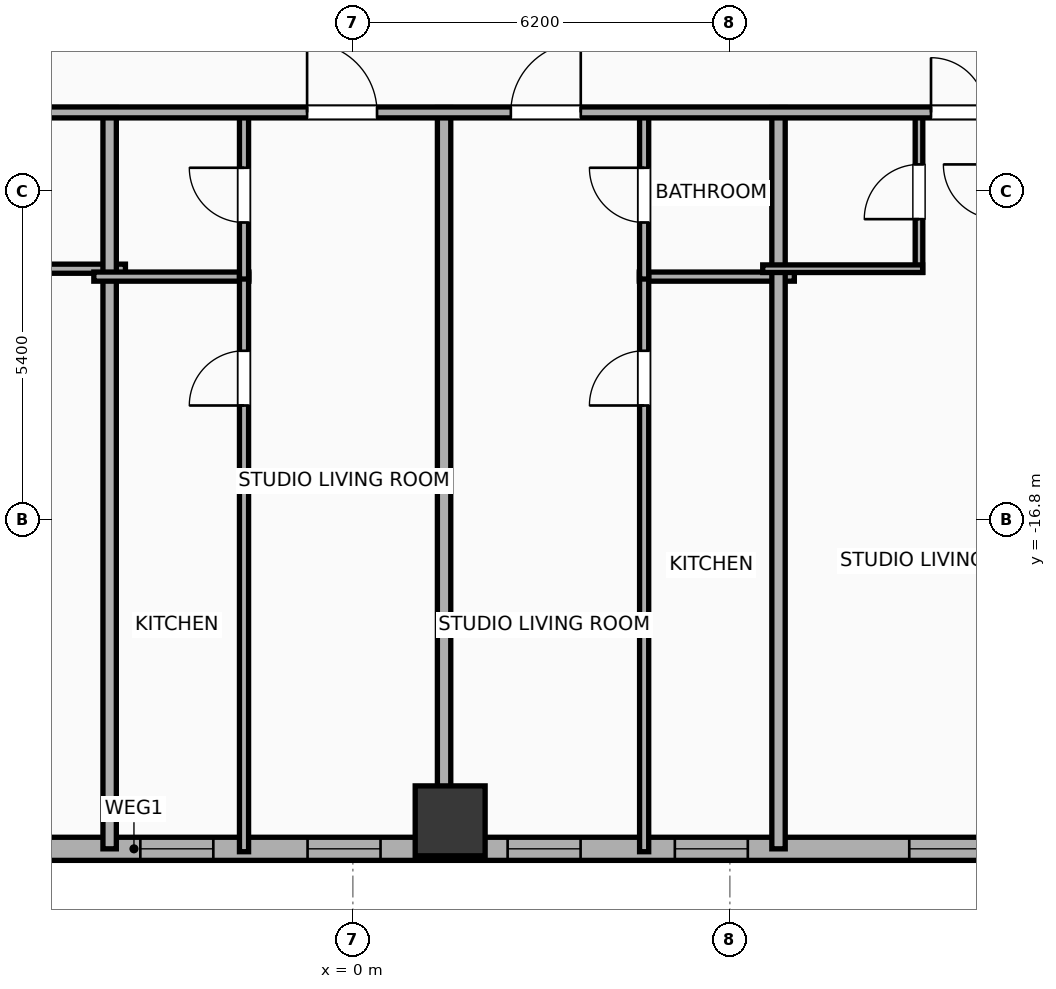
"""IFC4 building model, lengths in metres.
Left out: names, types, materials, properties, quantities, classifications, styles, units other than length and angle.
Written with IfcOpenShell. Run it as: python <this file> out.ifc"""

import sys

from ifc_helpers import new_model, si_unit, direction, frame, frame_2d, origin, origin_2d, place, context, subcontext, project, spatial, rectangle, hollow_rectangle, extrude, element, fill, save


model = new_model("IFC4")
c1 = context("Model", 3, precision=1e-05, world=origin(), true_north=direction((0.0, 1.0)))
c2 = subcontext(c1, "Body", "Model", "MODEL_VIEW")
j1 = project(units=[si_unit("LENGTHUNIT", "METRE"), si_unit("PLANEANGLEUNIT", "RADIAN")], contexts=[c1])
p1 = place(None, origin())
s1 = spatial("IfcSite", under=j1, at=p1, CompositionType="ELEMENT")
p2 = place(p1, origin())
s2 = spatial("IfcBuilding", under=s1, at=p2, CompositionType="ELEMENT")
p3 = place(p2, frame((0.0, 0.0, 68.9)))
s3 = spatial("IfcBuildingStorey", under=s2, at=p3, CompositionType="ELEMENT", Elevation=68.9)
p4 = place(p3, frame((1.6, -21.75, 0.0), z_axis=(0.0, 0.0, 1.0), x_axis=(1.0, 0.0, 0.0)))
e1 = element("IfcColumn", 1, at=p4, inside=s3, PredefinedType="COLUMN", context=c2, shape_type="SweptSolid", body=[
    extrude(hollow_rectangle(XDim=1.15, YDim=1.15, WallThickness=0.04, at=origin_2d()), origin(), (0.0, 0.0, 1.0), 3.9),
])
p5 = place(p3, frame((22.381, -22.21, 0.0), z_axis=(0.0, 0.0, 1.0), x_axis=(-1.0, 0.0, 0.0)))
e2 = element("IfcWall", 2, at=p5, inside=s3, PredefinedType="ELEMENTEDWALL", context=c2, shape_type="SweptSolid", body=[
    extrude(rectangle(XDim=51.963, YDim=0.38, at=frame_2d((25.981, 0.0))), origin(), (0.0, 0.0, 1.0), 3.65),
])
p6 = place(p5, frame((49.127, 0.0, 0.75)))
e3 = element("IfcOpeningElement", 3, at=p6, cuts=e2, PredefinedType="OPENING", context=c2, shape_type="SweptSolid", body=[
    extrude(rectangle(XDim=1.2, YDim=2.05, at=frame_2d((0.6, 1.025))), frame((0.0, 0.2, 0.0), z_axis=(0.0, -1.0, 0.0), x_axis=(1.0, 0.0, 0.0)), (0.0, 0.0, 1.0), 0.4),
])
p7 = place(p5, frame((43.926, 0.0, 0.75)))
e4 = element("IfcOpeningElement", 4, at=p7, cuts=e2, PredefinedType="OPENING", context=c2, shape_type="SweptSolid", body=[
    extrude(rectangle(XDim=1.2, YDim=2.05, at=frame_2d((0.6, 1.025))), frame((0.0, 0.2, 0.0), z_axis=(0.0, -1.0, 0.0), x_axis=(1.0, 0.0, 0.0)), (0.0, 0.0, 1.0), 0.4),
])
p8 = place(p5, frame((46.676, 0.0, 0.75)))
e5 = element("IfcOpeningElement", 5, at=p8, cuts=e2, PredefinedType="OPENING", context=c2, shape_type="SweptSolid", body=[
    extrude(rectangle(XDim=1.2, YDim=2.05, at=frame_2d((0.6, 1.025))), frame((0.0, 0.2, 0.0), z_axis=(0.0, -1.0, 0.0), x_axis=(1.0, 0.0, 0.0)), (0.0, 0.0, 1.0), 0.4),
])
p9 = place(p5, frame((39.531, 0.0, 0.75)))
e6 = element("IfcOpeningElement", 6, at=p9, cuts=e2, PredefinedType="OPENING", context=c2, shape_type="SweptSolid", body=[
    extrude(rectangle(XDim=1.2, YDim=2.05, at=frame_2d((0.6, 1.025))), frame((0.0, 0.2, 0.0), z_axis=(0.0, -1.0, 0.0), x_axis=(1.0, 0.0, 0.0)), (0.0, 0.0, 1.0), 0.4),
])
p10 = place(p5, frame((32.926, 0.0, 0.75)))
e7 = element("IfcOpeningElement", 7, at=p10, cuts=e2, PredefinedType="OPENING", context=c2, shape_type="SweptSolid", body=[
    extrude(rectangle(XDim=1.2, YDim=2.05, at=frame_2d((0.6, 1.025))), frame((0.0, 0.2, 0.0), z_axis=(0.0, -1.0, 0.0), x_axis=(1.0, 0.0, 0.0)), (0.0, 0.0, 1.0), 0.4),
])
p11 = place(p5, frame((35.676, 0.0, 0.75)))
e8 = element("IfcOpeningElement", 8, at=p11, cuts=e2, PredefinedType="OPENING", context=c2, shape_type="SweptSolid", body=[
    extrude(rectangle(XDim=1.2, YDim=2.05, at=frame_2d((0.6, 1.025))), frame((0.0, 0.2, 0.0), z_axis=(0.0, -1.0, 0.0), x_axis=(1.0, 0.0, 0.0)), (0.0, 0.0, 1.0), 0.4),
])
p12 = place(p5, frame((28.531, 0.0, 0.75)))
e9 = element("IfcOpeningElement", 9, at=p12, cuts=e2, PredefinedType="OPENING", context=c2, shape_type="SweptSolid", body=[
    extrude(rectangle(XDim=1.2, YDim=2.05, at=frame_2d((0.6, 1.025))), frame((0.0, 0.2, 0.0), z_axis=(0.0, -1.0, 0.0), x_axis=(1.0, 0.0, 0.0)), (0.0, 0.0, 1.0), 0.4),
])
p13 = place(p5, frame((21.926, 0.0, 0.75)))
e10 = element("IfcOpeningElement", 10, at=p13, cuts=e2, PredefinedType="OPENING", context=c2, shape_type="SweptSolid", body=[
    extrude(rectangle(XDim=1.2, YDim=2.05, at=frame_2d((0.6, 1.025))), frame((0.0, 0.2, 0.0), z_axis=(0.0, -1.0, 0.0), x_axis=(1.0, 0.0, 0.0)), (0.0, 0.0, 1.0), 0.4),
])
p14 = place(p5, frame((24.676, 0.0, 0.75)))
e11 = element("IfcOpeningElement", 11, at=p14, cuts=e2, PredefinedType="OPENING", context=c2, shape_type="SweptSolid", body=[
    extrude(rectangle(XDim=1.2, YDim=2.05, at=frame_2d((0.6, 1.025))), frame((0.0, 0.2, 0.0), z_axis=(0.0, -1.0, 0.0), x_axis=(1.0, 0.0, 0.0)), (0.0, 0.0, 1.0), 0.4),
])
p15 = place(p5, frame((18.636, 0.0, 0.75)))
e12 = element("IfcOpeningElement", 12, at=p15, cuts=e2, PredefinedType="OPENING", context=c2, shape_type="SweptSolid", body=[
    extrude(rectangle(XDim=1.2, YDim=2.05, at=frame_2d((0.6, 1.025))), frame((0.0, 0.2, 0.0), z_axis=(0.0, -1.0, 0.0), x_axis=(1.0, 0.0, 0.0)), (0.0, 0.0, 1.0), 0.4),
])
p16 = place(p5, frame((15.886, 0.0, 0.75)))
e13 = element("IfcOpeningElement", 13, at=p16, cuts=e2, PredefinedType="OPENING", context=c2, shape_type="SweptSolid", body=[
    extrude(rectangle(XDim=1.2, YDim=2.05, at=frame_2d((0.6, 1.025))), frame((0.0, 0.2, 0.0), z_axis=(0.0, -1.0, 0.0), x_axis=(1.0, 0.0, 0.0)), (0.0, 0.0, 1.0), 0.4),
])
p17 = place(p5, frame((12.031, 0.0, 0.75)))
e14 = element("IfcOpeningElement", 14, at=p17, cuts=e2, PredefinedType="OPENING", context=c2, shape_type="SweptSolid", body=[
    extrude(rectangle(XDim=1.2, YDim=2.05, at=frame_2d((0.6, 1.025))), frame((0.0, 0.2, 0.0), z_axis=(0.0, -1.0, 0.0), x_axis=(1.0, 0.0, 0.0)), (0.0, 0.0, 1.0), 0.4),
])
p18 = place(p5, frame((7.636, 0.0, 0.75)))
e15 = element("IfcOpeningElement", 15, at=p18, cuts=e2, PredefinedType="OPENING", context=c2, shape_type="SweptSolid", body=[
    extrude(rectangle(XDim=1.2, YDim=2.05, at=frame_2d((0.6, 1.025))), frame((0.0, 0.2, 0.0), z_axis=(0.0, -1.0, 0.0), x_axis=(1.0, 0.0, 0.0)), (0.0, 0.0, 1.0), 0.4),
])
p19 = place(p5, frame((4.886, 0.0, 0.75)))
e16 = element("IfcOpeningElement", 16, at=p19, cuts=e2, PredefinedType="OPENING", context=c2, shape_type="SweptSolid", body=[
    extrude(rectangle(XDim=1.2, YDim=2.05, at=frame_2d((0.6, 1.025))), frame((0.0, 0.2, 0.0), z_axis=(0.0, -1.0, 0.0), x_axis=(1.0, 0.0, 0.0)), (0.0, 0.0, 1.0), 0.4),
])
p20 = place(p5, frame((2.036, 0.0, 0.75)))
e17 = element("IfcOpeningElement", 17, at=p20, cuts=e2, PredefinedType="OPENING", context=c2, shape_type="SweptSolid", body=[
    extrude(rectangle(XDim=1.2, YDim=2.05, at=frame_2d((0.6, 1.025))), frame((0.0, 0.2, 0.0), z_axis=(0.0, -1.0, 0.0), x_axis=(1.0, 0.0, 0.0)), (0.0, 0.0, 1.0), 0.4),
])
p21 = place(p3, frame((-5.949, -12.67, 0.0), z_axis=(0.0, 0.0, 1.0), x_axis=(1.0, 0.0, 0.0)))
e18 = element("IfcWall", 18, at=p21, inside=s3, PredefinedType="PLUMBINGWALL", context=c2, shape_type="SweptSolid", body=[
    extrude(rectangle(XDim=2.209, YDim=0.15, at=frame_2d((1.104, 0.0))), origin(), (0.0, 0.0, 1.0), 3.65),
])
p22 = place(p3, frame((-4.0, -22.21, 0.0), z_axis=(0.0, 0.0, 1.0), x_axis=(0.0, 1.0, 0.0)))
e19 = element("IfcWall", 19, at=p22, inside=s3, PredefinedType="PARTITIONING", context=c2, shape_type="SweptSolid", body=[
    extrude(rectangle(XDim=12.19, YDim=0.22, at=frame_2d((6.095, 0.0))), origin(), (0.0, 0.0, 1.0), 3.65),
])
p23 = place(p3, frame((-4.26, -12.8, 0.0), z_axis=(0.0, 0.0, 1.0), x_axis=(1.0, 0.0, 0.0)))
e20 = element("IfcWall", 20, at=p23, inside=s3, PredefinedType="PLUMBINGWALL", context=c2, shape_type="SweptSolid", body=[
    extrude(rectangle(XDim=2.55, YDim=0.15, at=frame_2d((1.275, 0.0))), origin(), (0.0, 0.0, 1.0), 3.65),
])
p24 = place(p3, frame((-1.79, -22.258, 0.0), z_axis=(0.0, 0.0, 1.0), x_axis=(0.0, 1.0, 0.0)))
e21 = element("IfcWall", 21, at=p24, inside=s3, PredefinedType="PLUMBINGWALL", context=c2, shape_type="SweptSolid", body=[
    extrude(rectangle(XDim=9.498, YDim=0.15, at=frame_2d((4.749, 0.0))), origin(), (0.0, 0.0, 1.0), 3.65),
])
p25 = place(p24, frame((7.338, 0.0, 0.0)))
e22 = element("IfcOpeningElement", 22, at=p25, cuts=e21, PredefinedType="OPENING", context=c2, shape_type="SweptSolid", body=[
    extrude(rectangle(XDim=0.9, YDim=2.05, at=frame_2d((0.45, 1.025))), frame((0.0, 0.085, 0.0), z_axis=(0.0, -1.0, 0.0), x_axis=(1.0, 0.0, 0.0)), (0.0, 0.0, 1.0), 0.17),
])
p26 = place(p3, frame((-1.79, -12.84, 0.0), z_axis=(0.0, 0.0, 1.0), x_axis=(0.0, 1.0, 0.0)))
e23 = element("IfcWall", 23, at=p26, inside=s3, PredefinedType="PLUMBINGWALL", context=c2, shape_type="SweptSolid", body=[
    extrude(rectangle(XDim=2.76, YDim=0.15, at=frame_2d((1.38, 0.0))), origin(), (0.0, 0.0, 1.0), 3.65),
])
p27 = place(p26, frame((0.93, 0.0, 0.0)))
e24 = element("IfcOpeningElement", 24, at=p27, cuts=e23, PredefinedType="OPENING", context=c2, shape_type="SweptSolid", body=[
    extrude(rectangle(XDim=0.9, YDim=2.05, at=frame_2d((0.45, 1.025))), frame((0.0, 0.085, 0.0), z_axis=(0.0, -1.0, 0.0), x_axis=(1.0, 0.0, 0.0)), (0.0, 0.0, 1.0), 0.17),
])
p28 = place(p3, frame((1.5, -22.21, 0.0), z_axis=(0.0, 0.0, 1.0), x_axis=(0.0, 1.0, 0.0)))
e25 = element("IfcWall", 25, at=p28, inside=s3, PredefinedType="PARTITIONING", context=c2, shape_type="SweptSolid", body=[
    extrude(rectangle(XDim=12.19, YDim=0.22, at=frame_2d((6.095, 0.0))), origin(), (0.0, 0.0, 1.0), 2.94),
])
p29 = place(p3, frame((4.71, -12.8, 0.0), z_axis=(0.0, 0.0, 1.0), x_axis=(1.0, 0.0, 0.0)))
e26 = element("IfcWall", 26, at=p29, inside=s3, PredefinedType="PLUMBINGWALL", context=c2, shape_type="SweptSolid", body=[
    extrude(rectangle(XDim=2.55, YDim=0.15, at=frame_2d((1.275, 0.0))), origin(), (0.0, 0.0, 1.0), 3.65),
])
p30 = place(p3, frame((4.79, -22.258, 0.0), z_axis=(0.0, 0.0, 1.0), x_axis=(0.0, 1.0, 0.0)))
e27 = element("IfcWall", 27, at=p30, inside=s3, PredefinedType="PLUMBINGWALL", context=c2, shape_type="SweptSolid", body=[
    extrude(rectangle(XDim=9.498, YDim=0.15, at=frame_2d((4.749, 0.0))), origin(), (0.0, 0.0, 1.0), 3.65),
])
p31 = place(p30, frame((7.338, 0.0, 0.0)))
e28 = element("IfcOpeningElement", 28, at=p31, cuts=e27, PredefinedType="OPENING", context=c2, shape_type="SweptSolid", body=[
    extrude(rectangle(XDim=0.9, YDim=2.05, at=frame_2d((0.45, 1.025))), frame((0.0, 0.085, 0.0), z_axis=(0.0, -1.0, 0.0), x_axis=(1.0, 0.0, 0.0)), (0.0, 0.0, 1.0), 0.17),
])
p32 = place(p3, frame((4.79, -12.84, 0.0), z_axis=(0.0, 0.0, 1.0), x_axis=(0.0, 1.0, 0.0)))
e29 = element("IfcWall", 29, at=p32, inside=s3, PredefinedType="PLUMBINGWALL", context=c2, shape_type="SweptSolid", body=[
    extrude(rectangle(XDim=2.76, YDim=0.15, at=frame_2d((1.38, 0.0))), origin(), (0.0, 0.0, 1.0), 3.65),
])
p33 = place(p32, frame((0.93, 0.0, 0.0)))
e30 = element("IfcOpeningElement", 30, at=p33, cuts=e29, PredefinedType="OPENING", context=c2, shape_type="SweptSolid", body=[
    extrude(rectangle(XDim=0.9, YDim=2.05, at=frame_2d((0.45, 1.025))), frame((0.0, 0.085, 0.0), z_axis=(0.0, -1.0, 0.0), x_axis=(1.0, 0.0, 0.0)), (0.0, 0.0, 1.0), 0.17),
])
p34 = place(p3, frame((7.0, -22.21, 0.0), z_axis=(0.0, 0.0, 1.0), x_axis=(0.0, 1.0, 0.0)))
e31 = element("IfcWall", 31, at=p34, inside=s3, PredefinedType="PARTITIONING", context=c2, shape_type="SweptSolid", body=[
    extrude(rectangle(XDim=12.19, YDim=0.22, at=frame_2d((6.095, 0.0))), origin(), (0.0, 0.0, 1.0), 3.65),
])
p35 = place(p3, frame((9.31, -12.73, 0.0), z_axis=(0.0, 0.0, 1.0), x_axis=(0.0, 1.0, 0.0)))
e32 = element("IfcWall", 32, at=p35, inside=s3, PredefinedType="PARTITIONING", context=c2, shape_type="SweptSolid", body=[
    extrude(rectangle(XDim=2.65, YDim=0.125, at=frame_2d((1.325, 0.0))), origin(), (0.0, 0.0, 1.0), 3.65),
])
p36 = place(p35, frame((0.875, 0.0, 0.0)))
e33 = element("IfcOpeningElement", 33, at=p36, cuts=e32, PredefinedType="OPENING", context=c2, shape_type="SweptSolid", body=[
    extrude(rectangle(XDim=0.9, YDim=2.05, at=frame_2d((0.45, 1.025))), frame((0.0, 0.073, 0.0), z_axis=(0.0, -1.0, 0.0), x_axis=(1.0, 0.0, 0.0)), (0.0, 0.0, 1.0), 0.145),
])
p37 = place(p3, frame((6.74, -12.67, 0.0), z_axis=(0.0, 0.0, 1.0), x_axis=(1.0, 0.0, 0.0)))
e34 = element("IfcWall", 34, at=p37, inside=s3, PredefinedType="PARTITIONING", context=c2, shape_type="SweptSolid", body=[
    extrude(rectangle(XDim=2.63, YDim=0.125, at=frame_2d((1.315, 0.0))), origin(), (0.0, 0.0, 1.0), 3.65),
])
p38 = place(p3, frame((-33.41, -10.1, 0.0), z_axis=(0.0, 0.0, 1.0), x_axis=(1.0, 0.0, 0.0)))
e35 = element("IfcWall", 35, at=p38, inside=s3, PredefinedType="PARTITIONING", context=c2, shape_type="SweptSolid", body=[
    extrude(rectangle(XDim=59.62, YDim=0.18, at=frame_2d((29.81, 0.0))), origin(), (0.0, 0.0, 1.0), 3.65),
])
p39 = place(p38, frame((3.259, 0.0, 0.0)))
e36 = element("IfcOpeningElement", 36, at=p39, cuts=e35, PredefinedType="OPENING", context=c2, shape_type="SweptSolid", body=[
    extrude(rectangle(XDim=1.15, YDim=2.05, at=frame_2d((0.575, 1.025))), frame((0.0, 0.1, 0.0), z_axis=(0.0, -1.0, 0.0), x_axis=(1.0, 0.0, 0.0)), (0.0, 0.0, 1.0), 0.2),
])
p40 = place(p38, frame((10.657, 0.0, 0.0)))
e37 = element("IfcOpeningElement", 37, at=p40, cuts=e35, PredefinedType="OPENING", context=c2, shape_type="SweptSolid", body=[
    extrude(rectangle(XDim=1.15, YDim=2.05, at=frame_2d((0.575, 1.025))), frame((0.0, 0.1, 0.0), z_axis=(0.0, -1.0, 0.0), x_axis=(1.0, 0.0, 0.0)), (0.0, 0.0, 1.0), 0.2),
])
p41 = place(p38, frame((15.421, 0.0, 0.0)))
e38 = element("IfcOpeningElement", 38, at=p41, cuts=e35, PredefinedType="OPENING", context=c2, shape_type="SweptSolid", body=[
    extrude(rectangle(XDim=0.9, YDim=2.05, at=frame_2d((0.45, 1.025))), frame((0.0, 0.1, 0.0), z_axis=(0.0, -1.0, 0.0), x_axis=(1.0, 0.0, 0.0)), (0.0, 0.0, 1.0), 0.2),
])
p42 = place(p38, frame((21.657, 0.0, 0.0)))
e39 = element("IfcOpeningElement", 39, at=p42, cuts=e35, PredefinedType="OPENING", context=c2, shape_type="SweptSolid", body=[
    extrude(rectangle(XDim=1.15, YDim=2.05, at=frame_2d((0.575, 1.025))), frame((0.0, 0.1, 0.0), z_axis=(0.0, -1.0, 0.0), x_axis=(1.0, 0.0, 0.0)), (0.0, 0.0, 1.0), 0.2),
])
p43 = place(p38, frame((26.421, 0.0, 0.0)))
e40 = element("IfcOpeningElement", 40, at=p43, cuts=e35, PredefinedType="OPENING", context=c2, shape_type="SweptSolid", body=[
    extrude(rectangle(XDim=0.9, YDim=2.05, at=frame_2d((0.45, 1.025))), frame((0.0, 0.1, 0.0), z_axis=(0.0, -1.0, 0.0), x_axis=(1.0, 0.0, 0.0)), (0.0, 0.0, 1.0), 0.2),
])
p44 = place(p38, frame((32.657, 0.0, 0.0)))
e41 = element("IfcOpeningElement", 41, at=p44, cuts=e35, PredefinedType="OPENING", context=c2, shape_type="SweptSolid", body=[
    extrude(rectangle(XDim=1.15, YDim=2.05, at=frame_2d((0.575, 1.025))), frame((0.0, 0.1, 0.0), z_axis=(0.0, -1.0, 0.0), x_axis=(1.0, 0.0, 0.0)), (0.0, 0.0, 1.0), 0.2),
])
p45 = place(p38, frame((36.008, 0.0, 0.0)))
e42 = element("IfcOpeningElement", 42, at=p45, cuts=e35, PredefinedType="OPENING", context=c2, shape_type="SweptSolid", body=[
    extrude(rectangle(XDim=1.15, YDim=2.05, at=frame_2d((0.575, 1.025))), frame((0.0, 0.1, 0.0), z_axis=(0.0, -1.0, 0.0), x_axis=(1.0, 0.0, 0.0)), (0.0, 0.0, 1.0), 0.2),
])
p46 = place(p38, frame((42.917, 0.0, 0.0)))
e43 = element("IfcOpeningElement", 43, at=p46, cuts=e35, PredefinedType="OPENING", context=c2, shape_type="SweptSolid", body=[
    extrude(rectangle(XDim=0.9, YDim=2.05, at=frame_2d((0.45, 1.025))), frame((0.0, 0.1, 0.0), z_axis=(0.0, -1.0, 0.0), x_axis=(1.0, 0.0, 0.0)), (0.0, 0.0, 1.0), 0.2),
])
p47 = place(p38, frame((47.008, 0.0, 0.0)))
e44 = element("IfcOpeningElement", 44, at=p47, cuts=e35, PredefinedType="OPENING", context=c2, shape_type="SweptSolid", body=[
    extrude(rectangle(XDim=1.15, YDim=2.05, at=frame_2d((0.575, 1.025))), frame((0.0, 0.1, 0.0), z_axis=(0.0, -1.0, 0.0), x_axis=(1.0, 0.0, 0.0)), (0.0, 0.0, 1.0), 0.2),
])
p48 = place(p38, frame((55.14, 0.0, 0.0)))
e45 = element("IfcOpeningElement", 45, at=p48, cuts=e35, PredefinedType="OPENING", context=c2, shape_type="SweptSolid", body=[
    extrude(rectangle(XDim=1.15, YDim=2.05, at=frame_2d((0.575, 1.025))), frame((0.0, 0.1, 0.0), z_axis=(0.0, -1.0, 0.0), x_axis=(1.0, 0.0, 0.0)), (0.0, 0.0, 1.0), 0.2),
])
p49 = place(p13, origin())
e46 = element("IfcWindow", 46, at=p49, inside=s3, PartitioningType="SINGLE_PANEL", PredefinedType="WINDOW", context=c2, shape_type="SweptSolid", body=[
    extrude(rectangle(XDim=1.2, YDim=2.05, at=frame_2d((0.6, 1.025))), frame((0.0, 0.03, 0.0), z_axis=(0.0, -1.0, 0.0), x_axis=(1.0, 0.0, 0.0)), (0.0, 0.0, 1.0), 0.06),
])
fill(e10, e46)
p50 = place(p14, origin())
e47 = element("IfcWindow", 47, at=p50, inside=s3, PartitioningType="SINGLE_PANEL", PredefinedType="WINDOW", context=c2, shape_type="SweptSolid", body=[
    extrude(rectangle(XDim=1.2, YDim=2.05, at=frame_2d((0.6, 1.025))), frame((0.0, 0.03, 0.0), z_axis=(0.0, -1.0, 0.0), x_axis=(1.0, 0.0, 0.0)), (0.0, 0.0, 1.0), 0.06),
])
fill(e11, e47)
p51 = place(p15, origin())
e48 = element("IfcWindow", 48, at=p51, inside=s3, PartitioningType="SINGLE_PANEL", PredefinedType="WINDOW", context=c2, shape_type="SweptSolid", body=[
    extrude(rectangle(XDim=1.2, YDim=2.05, at=frame_2d((0.6, 1.025))), frame((0.0, 0.03, 0.0), z_axis=(0.0, -1.0, 0.0), x_axis=(1.0, 0.0, 0.0)), (0.0, 0.0, 1.0), 0.06),
])
fill(e12, e48)
p52 = place(p16, origin())
e49 = element("IfcWindow", 49, at=p52, inside=s3, PartitioningType="SINGLE_PANEL", PredefinedType="WINDOW", context=c2, shape_type="SweptSolid", body=[
    extrude(rectangle(XDim=1.2, YDim=2.05, at=frame_2d((0.6, 1.025))), frame((0.0, 0.03, 0.0), z_axis=(0.0, -1.0, 0.0), x_axis=(1.0, 0.0, 0.0)), (0.0, 0.0, 1.0), 0.06),
])
fill(e13, e49)
p53 = place(p17, origin())
e50 = element("IfcWindow", 50, at=p53, inside=s3, PartitioningType="SINGLE_PANEL", PredefinedType="WINDOW", context=c2, shape_type="SweptSolid", body=[
    extrude(rectangle(XDim=1.2, YDim=2.05, at=frame_2d((0.6, 1.025))), frame((0.0, 0.03, 0.0), z_axis=(0.0, -1.0, 0.0), x_axis=(1.0, 0.0, 0.0)), (0.0, 0.0, 1.0), 0.06),
])
fill(e14, e50)
p54 = place(p25, origin())
e51 = element("IfcDoor", 51, at=p54, inside=s3, OperationType="SINGLE_SWING_LEFT", PredefinedType="DOOR", context=c2, shape_type="SweptSolid", body=[
    extrude(rectangle(XDim=0.9, YDim=2.05, at=frame_2d((0.45, 1.025))), frame((0.0, 0.025, 0.0), z_axis=(0.0, -1.0, 0.0), x_axis=(1.0, 0.0, 0.0)), (0.0, 0.0, 1.0), 0.05),
])
fill(e22, e51)
p55 = place(p27, origin())
e52 = element("IfcDoor", 52, at=p55, inside=s3, OperationType="SINGLE_SWING_RIGHT", PredefinedType="DOOR", context=c2, shape_type="SweptSolid", body=[
    extrude(rectangle(XDim=0.9, YDim=2.05, at=frame_2d((0.45, 1.025))), frame((0.0, 0.025, 0.0), z_axis=(0.0, -1.0, 0.0), x_axis=(1.0, 0.0, 0.0)), (0.0, 0.0, 1.0), 0.05),
])
fill(e24, e52)
p56 = place(p31, origin())
e53 = element("IfcDoor", 53, at=p56, inside=s3, OperationType="SINGLE_SWING_LEFT", PredefinedType="DOOR", context=c2, shape_type="SweptSolid", body=[
    extrude(rectangle(XDim=0.9, YDim=2.05, at=frame_2d((0.45, 1.025))), frame((0.0, 0.025, 0.0), z_axis=(0.0, -1.0, 0.0), x_axis=(1.0, 0.0, 0.0)), (0.0, 0.0, 1.0), 0.05),
])
fill(e28, e53)
p57 = place(p33, origin())
e54 = element("IfcDoor", 54, at=p57, inside=s3, OperationType="SINGLE_SWING_RIGHT", PredefinedType="DOOR", context=c2, shape_type="SweptSolid", body=[
    extrude(rectangle(XDim=0.9, YDim=2.05, at=frame_2d((0.45, 1.025))), frame((0.0, 0.025, 0.0), z_axis=(0.0, -1.0, 0.0), x_axis=(1.0, 0.0, 0.0)), (0.0, 0.0, 1.0), 0.05),
])
fill(e30, e54)
p58 = place(p36, origin())
e55 = element("IfcDoor", 55, at=p58, inside=s3, OperationType="SINGLE_SWING_LEFT", PredefinedType="DOOR", context=c2, shape_type="SweptSolid", body=[
    extrude(rectangle(XDim=0.9, YDim=2.05, at=frame_2d((0.45, 1.025))), frame((0.0, 0.025, 0.0), z_axis=(0.0, -1.0, 0.0), x_axis=(1.0, 0.0, 0.0)), (0.0, 0.0, 1.0), 0.05),
])
fill(e33, e55)
p59 = place(p44, origin())
e56 = element("IfcDoor", 56, at=p59, inside=s3, OperationType="SINGLE_SWING_LEFT", PredefinedType="DOOR", context=c2, shape_type="SweptSolid", body=[
    extrude(rectangle(XDim=1.15, YDim=2.05, at=frame_2d((0.575, 1.025))), frame((0.0, 0.025, 0.0), z_axis=(0.0, -1.0, 0.0), x_axis=(1.0, 0.0, 0.0)), (0.0, 0.0, 1.0), 0.05),
])
fill(e41, e56)
p60 = place(p45, origin())
e57 = element("IfcDoor", 57, at=p60, inside=s3, OperationType="SINGLE_SWING_RIGHT", PredefinedType="DOOR", context=c2, shape_type="SweptSolid", body=[
    extrude(rectangle(XDim=1.15, YDim=2.05, at=frame_2d((0.575, 1.025))), frame((0.0, 0.025, 0.0), z_axis=(0.0, -1.0, 0.0), x_axis=(1.0, 0.0, 0.0)), (0.0, 0.0, 1.0), 0.05),
])
fill(e42, e57)
p61 = place(p46, origin())
e58 = element("IfcDoor", 58, at=p61, inside=s3, OperationType="SINGLE_SWING_LEFT", PredefinedType="DOOR", context=c2, shape_type="SweptSolid", body=[
    extrude(rectangle(XDim=0.9, YDim=2.05, at=frame_2d((0.45, 1.025))), frame((0.0, 0.025, 0.0), z_axis=(0.0, -1.0, 0.0), x_axis=(1.0, 0.0, 0.0)), (0.0, 0.0, 1.0), 0.05),
])
fill(e43, e58)
save(model, sys.argv[1])
